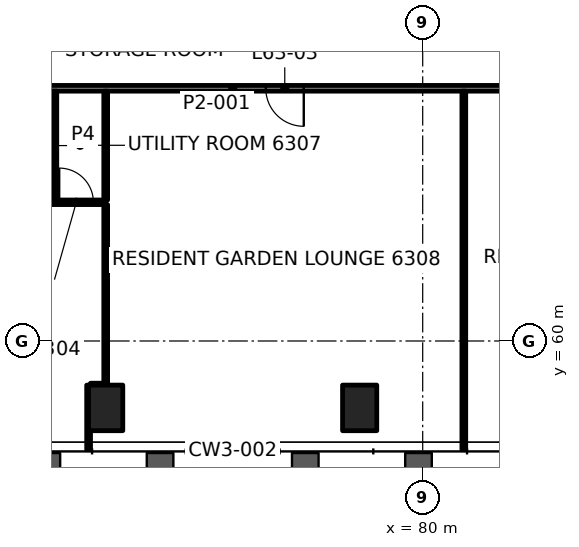
"""IFC4 building model, lengths in metres.
Left out: names, types, materials, properties, quantities, classifications, styles, units other than length and angle.
Written with IfcOpenShell. Run it as: python <this file> out.ifc"""

import sys

from ifc_helpers import new_model, si_unit, direction, frame, frame_2d, origin, origin_2d, place, context, subcontext, project, spatial, rectangle, hollow_rectangle, extrude, element, fill, save


model = new_model("IFC4")
c1 = context("Model", 3, precision=1e-05, world=origin(), true_north=direction((0.0, 1.0)))
c2 = subcontext(c1, "Body", "Model", "MODEL_VIEW")
j1 = project(units=[si_unit("LENGTHUNIT", "METRE"), si_unit("PLANEANGLEUNIT", "RADIAN")], contexts=[c1])
p1 = place(None, origin())
s1 = spatial("IfcSite", under=j1, at=p1, CompositionType="ELEMENT")
p2 = place(p1, origin())
s2 = spatial("IfcBuilding", under=s1, at=p2, CompositionType="ELEMENT")
p3 = place(p2, frame((0.0, 0.0, 267.1)))
s3 = spatial("IfcBuildingStorey", under=s2, at=p3, CompositionType="ELEMENT", Elevation=267.1)
for number, where, z_axis, x_axis in (
    (1, (71.659, 58.239, -0.0), (0.0, 0.0, 1.0), (1.0, 0.0, 0.0)),
    (2, (78.341, 58.239, -0.0), (0.0, 0.0, 1.0), (1.0, 0.0, 0.0)),
):
    element("IfcColumn", number, at=place(p3, frame(where, z_axis=z_axis, x_axis=x_axis)), inside=s3, PredefinedType="COLUMN", context=c2, shape_type="SweptSolid", body=[
        extrude(hollow_rectangle(XDim=0.9, YDim=1.2, WallThickness=0.06, at=origin_2d()), origin(), (0.0, 0.0, 1.0), 3.5),
    ])
p4 = place(p3, frame((71.259, 58.839, 0.0), z_axis=(0.0, 0.0, 1.0), x_axis=(1.0, 0.0, 0.0)))
e3 = element("IfcWall", 3, at=p4, inside=s3, PredefinedType="PARTITIONING", context=c2, shape_type="SweptSolid", body=[
    extrude(rectangle(XDim=0.349, YDim=0.1, at=frame_2d((0.174, 0.0))), origin(), (0.0, 0.0, 1.0), 2.7),
])
p5 = place(p3, frame((85.1, 66.65, 0.0), z_axis=(0.0, 0.0, 1.0), x_axis=(-1.0, 0.0, 0.0)))
e4 = element("IfcWall", 4, at=p5, inside=s3, PredefinedType="PARTITIONING", context=c2, shape_type="SweptSolid", body=[
    extrude(rectangle(XDim=20.2, YDim=0.15, at=frame_2d((10.1, 0.0))), origin(), (0.0, 0.0, 1.0), 2.7),
])
p6 = place(p5, frame((1.61, 0.0, 0.0)))
e5 = element("IfcOpeningElement", 5, at=p6, cuts=e4, PredefinedType="OPENING", context=c2, shape_type="SweptSolid", body=[
    extrude(rectangle(XDim=1.0, YDim=2.1, at=frame_2d((0.5, 1.05))), frame((0.0, 0.085, 0.0), z_axis=(0.0, -1.0, 0.0), x_axis=(1.0, 0.0, 0.0)), (0.0, 0.0, 1.0), 0.17),
])
p7 = place(p5, frame((8.229, 0.0, 0.0)))
e6 = element("IfcOpeningElement", 6, at=p7, cuts=e4, PredefinedType="OPENING", context=c2, shape_type="SweptSolid", body=[
    extrude(rectangle(XDim=1.0, YDim=2.1, at=frame_2d((0.5, 1.05))), frame((0.0, 0.085, 0.0), z_axis=(0.0, -1.0, 0.0), x_axis=(1.0, 0.0, 0.0)), (0.0, 0.0, 1.0), 0.17),
])
p8 = place(p3, frame((81.082, 57.139, 0.0), z_axis=(0.0, 0.0, 1.0), x_axis=(0.0, 1.0, 0.0)))
e7 = element("IfcWall", 7, at=p8, inside=s3, PredefinedType="PARTITIONING", context=c2, shape_type="SweptSolid", body=[
    extrude(rectangle(XDim=9.436, YDim=0.1, at=frame_2d((4.718, 0.0))), origin(), (0.0, 0.0, 1.0), 2.688),
])
p9 = place(p3, frame((71.659, 58.84, 0.0), z_axis=(0.0, 0.0, 1.0), x_axis=(0.0, 1.0, 0.0)))
e8 = element("IfcWall", 8, at=p9, inside=s3, PredefinedType="PARTITIONING", context=c2, shape_type="SweptSolid", body=[
    extrude(rectangle(XDim=4.75, YDim=0.1, at=frame_2d((2.375, 0.0))), origin(), (0.0, 0.0, 1.0), 2.7),
])
p10 = place(p3, frame((71.209, 57.139, 0.0), z_axis=(0.0, 0.0, 1.0), x_axis=(0.0, 1.0, 0.0)))
e9 = element("IfcWall", 9, at=p10, inside=s3, PredefinedType="PARTITIONING", context=c2, shape_type="SweptSolid", body=[
    extrude(rectangle(XDim=1.699, YDim=0.1, at=frame_2d((0.85, 0.0))), origin(), (0.0, 0.0, 1.0), 2.688),
])
p11 = place(p3, frame((70.311, 63.71, 0.0), z_axis=(0.0, 0.0, 1.0), x_axis=(0.0, 1.0, 0.0)))
e10 = element("IfcWall", 10, at=p11, inside=s3, PredefinedType="PARTITIONING", context=c2, shape_type="SweptSolid", body=[
    extrude(rectangle(XDim=2.865, YDim=0.12, at=frame_2d((1.433, 0.0))), origin(), (0.0, 0.0, 1.0), 2.7),
])
p12 = place(p3, frame((71.659, 63.71, 0.0), z_axis=(0.0, 0.0, 1.0), x_axis=(0.0, 1.0, 0.0)))
e11 = element("IfcWall", 11, at=p12, inside=s3, PredefinedType="PARTITIONING", context=c2, shape_type="SweptSolid", body=[
    extrude(rectangle(XDim=2.865, YDim=0.1, at=frame_2d((1.433, 0.0))), origin(), (0.0, 0.0, 1.0), 2.7),
])
p13 = place(p3, frame((65.704, 63.65, 0.0), z_axis=(0.0, 0.0, 1.0), x_axis=(1.0, 0.0, 0.0)))
e12 = element("IfcWall", 12, at=p13, inside=s3, PredefinedType="PARTITIONING", context=c2, shape_type="SweptSolid", body=[
    extrude(rectangle(XDim=5.955, YDim=0.12, at=frame_2d((2.977, 0.0))), origin(), (0.0, 0.0, 1.0), 2.7),
])
p14 = place(p13, frame((2.003, 0.0, 0.0)))
e13 = element("IfcOpeningElement", 13, at=p14, cuts=e12, PredefinedType="OPENING", context=c2, shape_type="SweptSolid", body=[
    extrude(rectangle(XDim=0.8, YDim=2.1, at=frame_2d((0.4, 1.05))), frame((0.0, 0.07, 0.0), z_axis=(0.0, -1.0, 0.0), x_axis=(1.0, 0.0, 0.0)), (0.0, 0.0, 1.0), 0.14),
])
p15 = place(p13, frame((4.731, 0.0, 0.0)))
e14 = element("IfcOpeningElement", 14, at=p15, cuts=e12, PredefinedType="OPENING", context=c2, shape_type="SweptSolid", body=[
    extrude(rectangle(XDim=0.9, YDim=2.1, at=frame_2d((0.45, 1.05))), frame((0.0, 0.07, 0.0), z_axis=(0.0, -1.0, 0.0), x_axis=(1.0, 0.0, 0.0)), (0.0, 0.0, 1.0), 0.14),
])
p16 = place(p3, frame((105.682, 64.079, 0.0), z_axis=(0.0, 0.0, 1.0), x_axis=(-0.500001689899, 0.866024428119, 0.0)))
e15 = element("IfcWall", 15, at=p16, inside=s3, PredefinedType="SOLIDWALL", context=c2, shape_type="SweptSolid", body=[
    extrude(rectangle(XDim=49.597, YDim=0.8, at=frame_2d((24.799, 0.0))), origin(), (0.0, 0.0, 1.0), 0.9),
])
p17 = place(p7, origin())
e16 = element("IfcDoor", 16, at=p17, inside=s3, OperationType="SINGLE_SWING_RIGHT", PredefinedType="DOOR", context=c2, shape_type="SweptSolid", body=[
    extrude(rectangle(XDim=1.0, YDim=2.1, at=frame_2d((0.5, 1.05))), frame((0.0, 0.025, 0.0), z_axis=(0.0, -1.0, 0.0), x_axis=(1.0, 0.0, 0.0)), (0.0, 0.0, 1.0), 0.05),
])
fill(e6, e16)
p18 = place(p15, origin())
e17 = element("IfcDoor", 17, at=p18, inside=s3, OperationType="SINGLE_SWING_LEFT", PredefinedType="DOOR", context=c2, shape_type="SweptSolid", body=[
    extrude(rectangle(XDim=0.9, YDim=2.1, at=frame_2d((0.45, 1.05))), frame((0.0, 0.025, 0.0), z_axis=(0.0, -1.0, 0.0), x_axis=(1.0, 0.0, 0.0)), (0.0, 0.0, 1.0), 0.05),
])
fill(e14, e17)
save(model, sys.argv[1])
